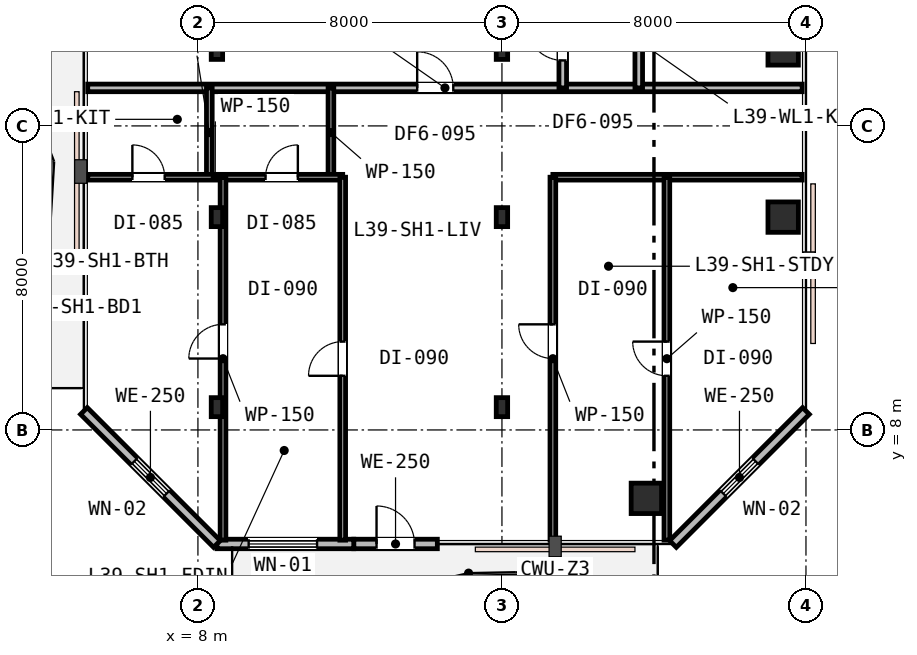
"""IFC4 building model, lengths in metres.
Left out: names, types, materials, properties, quantities, classifications, styles, units other than length and angle.
Written with IfcOpenShell. Run it as: python <this file> out.ifc"""

import sys

from ifc_helpers import new_model, si_unit, direction, frame, frame_2d, origin, origin_2d, place, context, subcontext, project, spatial, rectangle, i_section, extrude, element, fill, save


model = new_model("IFC4")
c1 = context("Model", 3, precision=1e-05, world=origin(), true_north=direction((0.0, 1.0)))
c2 = subcontext(c1, "Body", "Model", "MODEL_VIEW")
j1 = project(units=[si_unit("LENGTHUNIT", "METRE"), si_unit("PLANEANGLEUNIT", "RADIAN")], contexts=[c1])
p1 = place(None, origin())
s1 = spatial("IfcSite", under=j1, at=p1, CompositionType="ELEMENT")
p2 = place(p1, origin())
s2 = spatial("IfcBuilding", under=s1, at=p2, CompositionType="ELEMENT")
p3 = place(p2, frame((0.0, 0.0, 154.2)))
s3 = spatial("IfcBuildingStorey", under=s2, at=p3, CompositionType="ELEMENT", Elevation=154.2)
for number, where, z_axis, x_axis in (
    (1, (19.8, 6.2, 0.0), (0.0, 0.0, 1.0), (1.0, 0.0, 0.0)),
    (2, (23.4, 13.6, 0.0), (0.0, 0.0, 1.0), (1.0, 0.0, 0.0)),
    (3, (23.4, 18.0, 0.0), (0.0, 0.0, 1.0), (1.0, 0.0, 0.0)),
):
    element("IfcColumn", number, at=place(p3, frame(where, z_axis=z_axis, x_axis=x_axis)), inside=s3, PredefinedType="COLUMN", context=c2, shape_type="SweptSolid", body=[
        extrude(rectangle(XDim=0.8, YDim=0.8, at=origin_2d()), origin(), (0.0, 0.0, 1.0), 3.6),
    ])
for number, where, z_axis, x_axis in (
    (4, (8.5, 8.6, 0.0), (0.0, 0.0, 1.0), (1.0, 0.0, 0.0)),
    (5, (16.0, 8.6, 0.0), (0.0, 0.0, 1.0), (1.0, 0.0, 0.0)),
    (6, (8.5, 13.6, 0.0), (0.0, 0.0, 1.0), (1.0, 0.0, 0.0)),
    (7, (16.0, 13.6, 0.0), (0.0, 0.0, 1.0), (1.0, 0.0, 0.0)),
    (8, (8.5, 18.0, 0.0), (0.0, 0.0, 1.0), (1.0, 0.0, 0.0)),
    (9, (16.0, 18.0, 0.0), (0.0, 0.0, 1.0), (1.0, 0.0, 0.0)),
):
    element("IfcColumn", number, at=place(p3, frame(where, z_axis=z_axis, x_axis=x_axis)), inside=s3, PredefinedType="COLUMN", context=c2, shape_type="SweptSolid", body=[
        extrude(i_section(OverallWidth=0.3, OverallDepth=0.5, WebThickness=0.015, FlangeThickness=0.028, FilletRadius=0.027, at=origin_2d()), origin(), (0.0, 0.0, 1.0), 3.6),
    ])
p4 = place(p3, frame((12.1, 5.0, 0.0), z_axis=(0.0, 0.0, 1.0), x_axis=(1.0, 0.0, 0.0)))
e10 = element("IfcWall", 10, at=p4, inside=s3, PredefinedType="STANDARD", context=c2, shape_type="SweptSolid", body=[
    extrude(rectangle(XDim=2.2, YDim=0.25, at=frame_2d((1.1, 0.0))), origin(), (0.0, 0.0, 1.0), 3.33),
])
p5 = place(p4, frame((0.6, 0.0, 0.0)))
e11 = element("IfcOpeningElement", 11, at=p5, cuts=e10, PredefinedType="OPENING", context=c2, shape_type="SweptSolid", body=[
    extrude(rectangle(XDim=1.0, YDim=2.15, at=frame_2d((0.5, 1.075))), frame((0.0, 0.135, 0.0), z_axis=(0.0, -1.0, 0.0), x_axis=(1.0, 0.0, 0.0)), (0.0, 0.0, 1.0), 0.27),
])
p6 = place(p3, frame((8.5, 5.0, 0.0), z_axis=(0.0, 0.0, 1.0), x_axis=(1.0, 0.0, 0.0)))
e12 = element("IfcWall", 12, at=p6, inside=s3, PredefinedType="STANDARD", context=c2, shape_type="SweptSolid", body=[
    extrude(rectangle(XDim=3.6, YDim=0.25, at=frame_2d((1.8, 0.0))), origin(), (0.0, 0.0, 1.0), 3.33),
])
p7 = place(p6, frame((0.835, 0.0, 0.75)))
e13 = element("IfcOpeningElement", 13, at=p7, cuts=e12, PredefinedType="OPENING", context=c2, shape_type="SweptSolid", body=[
    extrude(rectangle(XDim=1.8, YDim=1.85, at=frame_2d((0.9, 0.925))), frame((0.0, 0.135, 0.0), z_axis=(0.0, -1.0, 0.0), x_axis=(1.0, 0.0, 0.0)), (0.0, 0.0, 1.0), 0.27),
])
p8 = place(p3, frame((20.5, 5.0, 0.0), z_axis=(0.0, 0.0, 1.0), x_axis=(0.707106781187, 0.707106781187, 0.0)))
e14 = element("IfcWall", 14, at=p8, inside=s3, PredefinedType="STANDARD", context=c2, shape_type="SweptSolid", body=[
    extrude(rectangle(XDim=4.95, YDim=0.25, at=frame_2d((2.475, 0.0))), origin(), (0.0, 0.0, 1.0), 3.33),
])
p9 = place(p8, frame((1.875, 0.0, 0.85)))
e15 = element("IfcOpeningElement", 15, at=p9, cuts=e14, PredefinedType="OPENING", context=c2, shape_type="SweptSolid", body=[
    extrude(rectangle(XDim=1.2, YDim=1.6, at=frame_2d((0.6, 0.8))), frame((0.0, 0.135, 0.0), z_axis=(0.0, -1.0, 0.0), x_axis=(1.0, 0.0, 0.0)), (0.0, 0.0, 1.0), 0.27),
])
p10 = place(p3, frame((5.0, 8.5, 0.0), z_axis=(0.0, 0.0, 1.0), x_axis=(0.707106781187, -0.707106781187, 0.0)))
e16 = element("IfcWall", 16, at=p10, inside=s3, PredefinedType="STANDARD", context=c2, shape_type="SweptSolid", body=[
    extrude(rectangle(XDim=4.95, YDim=0.25, at=frame_2d((2.475, 0.0))), origin(), (0.0, 0.0, 1.0), 3.33),
])
p11 = place(p10, frame((1.875, 0.0, 0.85)))
e17 = element("IfcOpeningElement", 17, at=p11, cuts=e16, PredefinedType="OPENING", context=c2, shape_type="SweptSolid", body=[
    extrude(rectangle(XDim=1.2, YDim=1.6, at=frame_2d((0.6, 0.8))), frame((0.0, 0.135, 0.0), z_axis=(0.0, -1.0, 0.0), x_axis=(1.0, 0.0, 0.0)), (0.0, 0.0, 1.0), 0.27),
])
p12 = place(p3, frame((5.1, 17.0, 0.0), z_axis=(0.0, 0.0, 1.0), x_axis=(1.0, 0.0, 0.0)))
e18 = element("IfcWall", 18, at=p12, inside=s3, PredefinedType="PARTITIONING", context=c2, shape_type="SweptSolid", body=[
    extrude(rectangle(XDim=18.8, YDim=0.2, at=frame_2d((9.4, 0.0))), origin(), (0.0, 0.0, 1.0), 2.93),
])
p13 = place(p12, frame((8.669, 0.0, 0.0)))
e19 = element("IfcOpeningElement", 19, at=p13, cuts=e18, PredefinedType="OPENING", context=c2, shape_type="SweptSolid", body=[
    extrude(rectangle(XDim=0.95, YDim=2.15, at=frame_2d((0.475, 1.075))), frame((0.0, 0.11, 0.0), z_axis=(0.0, -1.0, 0.0), x_axis=(1.0, 0.0, 0.0)), (0.0, 0.0, 1.0), 0.22),
])
p14 = place(p3, frame((17.6, 17.0, 0.0), z_axis=(0.0, 0.0, 1.0), x_axis=(0.0, 1.0, 0.0)))
e20 = element("IfcWall", 20, at=p14, inside=s3, PredefinedType="PARTITIONING", context=c2, shape_type="SweptSolid", body=[
    extrude(rectangle(XDim=11.6, YDim=0.2, at=frame_2d((5.8, 0.0))), origin(), (0.0, 0.0, 1.0), 2.93),
])
p15 = place(p14, frame((0.723, 0.0, 0.0)))
e21 = element("IfcOpeningElement", 21, at=p15, cuts=e20, PredefinedType="OPENING", context=c2, shape_type="SweptSolid", body=[
    extrude(rectangle(XDim=0.95, YDim=2.15, at=frame_2d((0.475, 1.075))), frame((0.0, 0.11, 0.0), z_axis=(0.0, -1.0, 0.0), x_axis=(1.0, 0.0, 0.0)), (0.0, 0.0, 1.0), 0.22),
])
p16 = place(p3, frame((19.6, 17.0, 0.0), z_axis=(0.0, 0.0, 1.0), x_axis=(0.0, 1.0, 0.0)))
e22 = element("IfcWall", 22, at=p16, inside=s3, PredefinedType="PARTITIONING", context=c2, shape_type="SweptSolid", body=[
    extrude(rectangle(XDim=11.6, YDim=0.2, at=frame_2d((5.8, 0.0))), origin(), (0.0, 0.0, 1.0), 2.93),
])
p17 = place(p16, frame((3.125, 0.0, 0.0)))
e23 = element("IfcOpeningElement", 23, at=p17, cuts=e22, PredefinedType="OPENING", context=c2, shape_type="SweptSolid", body=[
    extrude(rectangle(XDim=0.95, YDim=2.15, at=frame_2d((0.475, 1.075))), frame((0.0, 0.11, 0.0), z_axis=(0.0, -1.0, 0.0), x_axis=(1.0, 0.0, 0.0)), (0.0, 0.0, 1.0), 0.22),
])
p18 = place(p3, frame((11.5, 14.65, 0.0), z_axis=(0.0, 0.0, 1.0), x_axis=(0.0, 1.0, 0.0)))
e24 = element("IfcWall", 24, at=p18, inside=s3, PredefinedType="PARTITIONING", context=c2, shape_type="SweptSolid", body=[
    extrude(rectangle(XDim=2.35, YDim=0.15, at=frame_2d((1.175, 0.0))), origin(), (0.0, 0.0, 1.0), 2.96),
])
p19 = place(p3, frame((8.3, 14.65, 0.0), z_axis=(0.0, 0.0, 1.0), x_axis=(0.0, 1.0, 0.0)))
e25 = element("IfcWall", 25, at=p19, inside=s3, PredefinedType="PARTITIONING", context=c2, shape_type="SweptSolid", body=[
    extrude(rectangle(XDim=2.35, YDim=0.15, at=frame_2d((1.175, 0.0))), origin(), (0.0, 0.0, 1.0), 2.93),
])
p20 = place(p3, frame((5.1, 14.65, 0.0), z_axis=(0.0, 0.0, 1.0), x_axis=(1.0, 0.0, 0.0)))
e26 = element("IfcWall", 26, at=p20, inside=s3, PredefinedType="PARTITIONING", context=c2, shape_type="SweptSolid", body=[
    extrude(rectangle(XDim=6.71, YDim=0.15, at=frame_2d((3.355, 0.0))), origin(), (0.0, 0.0, 1.0), 2.93),
])
p21 = place(p20, frame((1.175, 0.0, 0.0)))
e27 = element("IfcOpeningElement", 27, at=p21, cuts=e26, PredefinedType="OPENING", context=c2, shape_type="SweptSolid", body=[
    extrude(rectangle(XDim=0.85, YDim=2.15, at=frame_2d((0.425, 1.075))), frame((0.0, 0.085, 0.0), z_axis=(0.0, -1.0, 0.0), x_axis=(1.0, 0.0, 0.0)), (0.0, 0.0, 1.0), 0.17),
])
p22 = place(p20, frame((4.679, 0.0, 0.0)))
e28 = element("IfcOpeningElement", 28, at=p22, cuts=e26, PredefinedType="OPENING", context=c2, shape_type="SweptSolid", body=[
    extrude(rectangle(XDim=0.85, YDim=2.15, at=frame_2d((0.425, 1.075))), frame((0.0, 0.085, 0.0), z_axis=(0.0, -1.0, 0.0), x_axis=(1.0, 0.0, 0.0)), (0.0, 0.0, 1.0), 0.17),
])
p23 = place(p3, frame((17.34, 14.65, 0.0), z_axis=(0.0, 0.0, 1.0), x_axis=(1.0, 0.0, 0.0)))
e29 = element("IfcWall", 29, at=p23, inside=s3, PredefinedType="PARTITIONING", context=c2, shape_type="SweptSolid", body=[
    extrude(rectangle(XDim=6.56, YDim=0.15, at=frame_2d((3.28, 0.0))), origin(), (0.0, 0.0, 1.0), 2.96),
])
p24 = place(p3, frame((8.66, 5.1, 0.0), z_axis=(0.0, 0.0, 1.0), x_axis=(0.0, 1.0, 0.0)))
e30 = element("IfcWall", 30, at=p24, inside=s3, PredefinedType="PARTITIONING", context=c2, shape_type="SweptSolid", body=[
    extrude(rectangle(XDim=9.55, YDim=0.15, at=frame_2d((4.775, 0.0))), origin(), (0.0, 0.0, 1.0), 2.93),
])
p25 = place(p24, frame((4.779, 0.0, 0.0)))
e31 = element("IfcOpeningElement", 31, at=p25, cuts=e30, PredefinedType="OPENING", context=c2, shape_type="SweptSolid", body=[
    extrude(rectangle(XDim=0.9, YDim=2.15, at=frame_2d((0.45, 1.075))), frame((0.0, 0.085, 0.0), z_axis=(0.0, -1.0, 0.0), x_axis=(1.0, 0.0, 0.0)), (0.0, 0.0, 1.0), 0.17),
])
p26 = place(p3, frame((20.34, 5.1, 0.0), z_axis=(0.0, 0.0, 1.0), x_axis=(0.0, 1.0, 0.0)))
e32 = element("IfcWall", 32, at=p26, inside=s3, PredefinedType="PARTITIONING", context=c2, shape_type="SweptSolid", body=[
    extrude(rectangle(XDim=9.55, YDim=0.15, at=frame_2d((4.775, 0.0))), origin(), (0.0, 0.0, 1.0), 2.93),
])
p27 = place(p26, frame((4.325, 0.0, 0.0)))
e33 = element("IfcOpeningElement", 33, at=p27, cuts=e32, PredefinedType="OPENING", context=c2, shape_type="SweptSolid", body=[
    extrude(rectangle(XDim=0.9, YDim=2.15, at=frame_2d((0.45, 1.075))), frame((0.0, 0.085, 0.0), z_axis=(0.0, -1.0, 0.0), x_axis=(1.0, 0.0, 0.0)), (0.0, 0.0, 1.0), 0.17),
])
p28 = place(p3, frame((17.34, 5.1, 0.0), z_axis=(0.0, 0.0, 1.0), x_axis=(0.0, 1.0, 0.0)))
e34 = element("IfcWall", 34, at=p28, inside=s3, PredefinedType="PARTITIONING", context=c2, shape_type="SweptSolid", body=[
    extrude(rectangle(XDim=9.55, YDim=0.15, at=frame_2d((4.775, 0.0))), origin(), (0.0, 0.0, 1.0), 2.93),
])
p29 = place(p28, frame((4.779, 0.0, 0.0)))
e35 = element("IfcOpeningElement", 35, at=p29, cuts=e34, PredefinedType="OPENING", context=c2, shape_type="SweptSolid", body=[
    extrude(rectangle(XDim=0.9, YDim=2.15, at=frame_2d((0.45, 1.075))), frame((0.0, 0.085, 0.0), z_axis=(0.0, -1.0, 0.0), x_axis=(1.0, 0.0, 0.0)), (0.0, 0.0, 1.0), 0.17),
])
p30 = place(p3, frame((11.81, 5.1, 0.0), z_axis=(0.0, 0.0, 1.0), x_axis=(0.0, 1.0, 0.0)))
e36 = element("IfcWall", 36, at=p30, inside=s3, PredefinedType="PARTITIONING", context=c2, shape_type="SweptSolid", body=[
    extrude(rectangle(XDim=9.55, YDim=0.15, at=frame_2d((4.775, 0.0))), origin(), (0.0, 0.0, 1.0), 2.93),
])
p31 = place(p30, frame((4.325, 0.0, 0.0)))
e37 = element("IfcOpeningElement", 37, at=p31, cuts=e36, PredefinedType="OPENING", context=c2, shape_type="SweptSolid", body=[
    extrude(rectangle(XDim=0.9, YDim=2.15, at=frame_2d((0.45, 1.075))), frame((0.0, 0.085, 0.0), z_axis=(0.0, -1.0, 0.0), x_axis=(1.0, 0.0, 0.0)), (0.0, 0.0, 1.0), 0.17),
])
p32 = place(p5, origin())
e38 = element("IfcDoor", 38, at=p32, inside=s3, OperationType="SINGLE_SWING_LEFT", PredefinedType="DOOR", context=c2, shape_type="SweptSolid", body=[
    extrude(rectangle(XDim=1.0, YDim=2.15, at=frame_2d((0.5, 1.075))), frame((0.0, 0.025, 0.0), z_axis=(0.0, -1.0, 0.0), x_axis=(1.0, 0.0, 0.0)), (0.0, 0.0, 1.0), 0.05),
])
fill(e11, e38)
p33 = place(p7, origin())
e39 = element("IfcWindow", 39, at=p33, inside=s3, PartitioningType="SINGLE_PANEL", PredefinedType="WINDOW", context=c2, shape_type="SweptSolid", body=[
    extrude(rectangle(XDim=1.8, YDim=1.85, at=frame_2d((0.9, 0.925))), frame((0.0, 0.03, 0.0), z_axis=(0.0, -1.0, 0.0), x_axis=(1.0, 0.0, 0.0)), (0.0, 0.0, 1.0), 0.06),
])
fill(e13, e39)
p34 = place(p9, origin())
e40 = element("IfcWindow", 40, at=p34, inside=s3, PartitioningType="SINGLE_PANEL", PredefinedType="WINDOW", context=c2, shape_type="SweptSolid", body=[
    extrude(rectangle(XDim=1.2, YDim=1.6, at=frame_2d((0.6, 0.8))), frame((0.0, 0.03, 0.0), z_axis=(0.0, -1.0, 0.0), x_axis=(1.0, 0.0, 0.0)), (0.0, 0.0, 1.0), 0.06),
])
fill(e15, e40)
p35 = place(p11, origin())
e41 = element("IfcWindow", 41, at=p35, inside=s3, PartitioningType="SINGLE_PANEL", PredefinedType="WINDOW", context=c2, shape_type="SweptSolid", body=[
    extrude(rectangle(XDim=1.2, YDim=1.6, at=frame_2d((0.6, 0.8))), frame((0.0, 0.03, 0.0), z_axis=(0.0, -1.0, 0.0), x_axis=(1.0, 0.0, 0.0)), (0.0, 0.0, 1.0), 0.06),
])
fill(e17, e41)
p36 = place(p15, origin())
e42 = element("IfcDoor", 42, at=p36, inside=s3, OperationType="SINGLE_SWING_RIGHT", PredefinedType="DOOR", context=c2, shape_type="SweptSolid", body=[
    extrude(rectangle(XDim=0.95, YDim=2.15, at=frame_2d((0.475, 1.075))), frame((0.0, 0.025, 0.0), z_axis=(0.0, -1.0, 0.0), x_axis=(1.0, 0.0, 0.0)), (0.0, 0.0, 1.0), 0.05),
])
fill(e21, e42)
p37 = place(p13, origin())
e43 = element("IfcDoor", 43, at=p37, inside=s3, OperationType="SINGLE_SWING_LEFT", PredefinedType="DOOR", context=c2, shape_type="SweptSolid", body=[
    extrude(rectangle(XDim=0.95, YDim=2.15, at=frame_2d((0.475, 1.075))), frame((0.0, 0.025, 0.0), z_axis=(0.0, -1.0, 0.0), x_axis=(1.0, 0.0, 0.0)), (0.0, 0.0, 1.0), 0.05),
])
fill(e19, e43)
p38 = place(p21, origin())
e44 = element("IfcDoor", 44, at=p38, inside=s3, OperationType="SINGLE_SWING_LEFT", PredefinedType="DOOR", context=c2, shape_type="SweptSolid", body=[
    extrude(rectangle(XDim=0.85, YDim=2.15, at=frame_2d((0.425, 1.075))), frame((0.0, 0.025, 0.0), z_axis=(0.0, -1.0, 0.0), x_axis=(1.0, 0.0, 0.0)), (0.0, 0.0, 1.0), 0.05),
])
fill(e27, e44)
p39 = place(p22, origin())
e45 = element("IfcDoor", 45, at=p39, inside=s3, OperationType="SINGLE_SWING_RIGHT", PredefinedType="DOOR", context=c2, shape_type="SweptSolid", body=[
    extrude(rectangle(XDim=0.85, YDim=2.15, at=frame_2d((0.425, 1.075))), frame((0.0, 0.025, 0.0), z_axis=(0.0, -1.0, 0.0), x_axis=(1.0, 0.0, 0.0)), (0.0, 0.0, 1.0), 0.05),
])
fill(e28, e45)
p40 = place(p25, origin())
e46 = element("IfcDoor", 46, at=p40, inside=s3, OperationType="SINGLE_SWING_LEFT", PredefinedType="DOOR", context=c2, shape_type="SweptSolid", body=[
    extrude(rectangle(XDim=0.9, YDim=2.15, at=frame_2d((0.45, 1.075))), frame((0.0, 0.025, 0.0), z_axis=(0.0, -1.0, 0.0), x_axis=(1.0, 0.0, 0.0)), (0.0, 0.0, 1.0), 0.05),
])
fill(e31, e46)
p41 = place(p27, origin())
e47 = element("IfcDoor", 47, at=p41, inside=s3, OperationType="SINGLE_SWING_RIGHT", PredefinedType="DOOR", context=c2, shape_type="SweptSolid", body=[
    extrude(rectangle(XDim=0.9, YDim=2.15, at=frame_2d((0.45, 1.075))), frame((0.0, 0.025, 0.0), z_axis=(0.0, -1.0, 0.0), x_axis=(1.0, 0.0, 0.0)), (0.0, 0.0, 1.0), 0.05),
])
fill(e33, e47)
p42 = place(p29, origin())
e48 = element("IfcDoor", 48, at=p42, inside=s3, OperationType="SINGLE_SWING_RIGHT", PredefinedType="DOOR", context=c2, shape_type="SweptSolid", body=[
    extrude(rectangle(XDim=0.9, YDim=2.15, at=frame_2d((0.45, 1.075))), frame((0.0, 0.025, 0.0), z_axis=(0.0, -1.0, 0.0), x_axis=(1.0, 0.0, 0.0)), (0.0, 0.0, 1.0), 0.05),
])
fill(e35, e48)
p43 = place(p31, origin())
e49 = element("IfcDoor", 49, at=p43, inside=s3, OperationType="SINGLE_SWING_LEFT", PredefinedType="DOOR", context=c2, shape_type="SweptSolid", body=[
    extrude(rectangle(XDim=0.9, YDim=2.15, at=frame_2d((0.45, 1.075))), frame((0.0, 0.025, 0.0), z_axis=(0.0, -1.0, 0.0), x_axis=(1.0, 0.0, 0.0)), (0.0, 0.0, 1.0), 0.05),
])
fill(e37, e49)
save(model, sys.argv[1])
